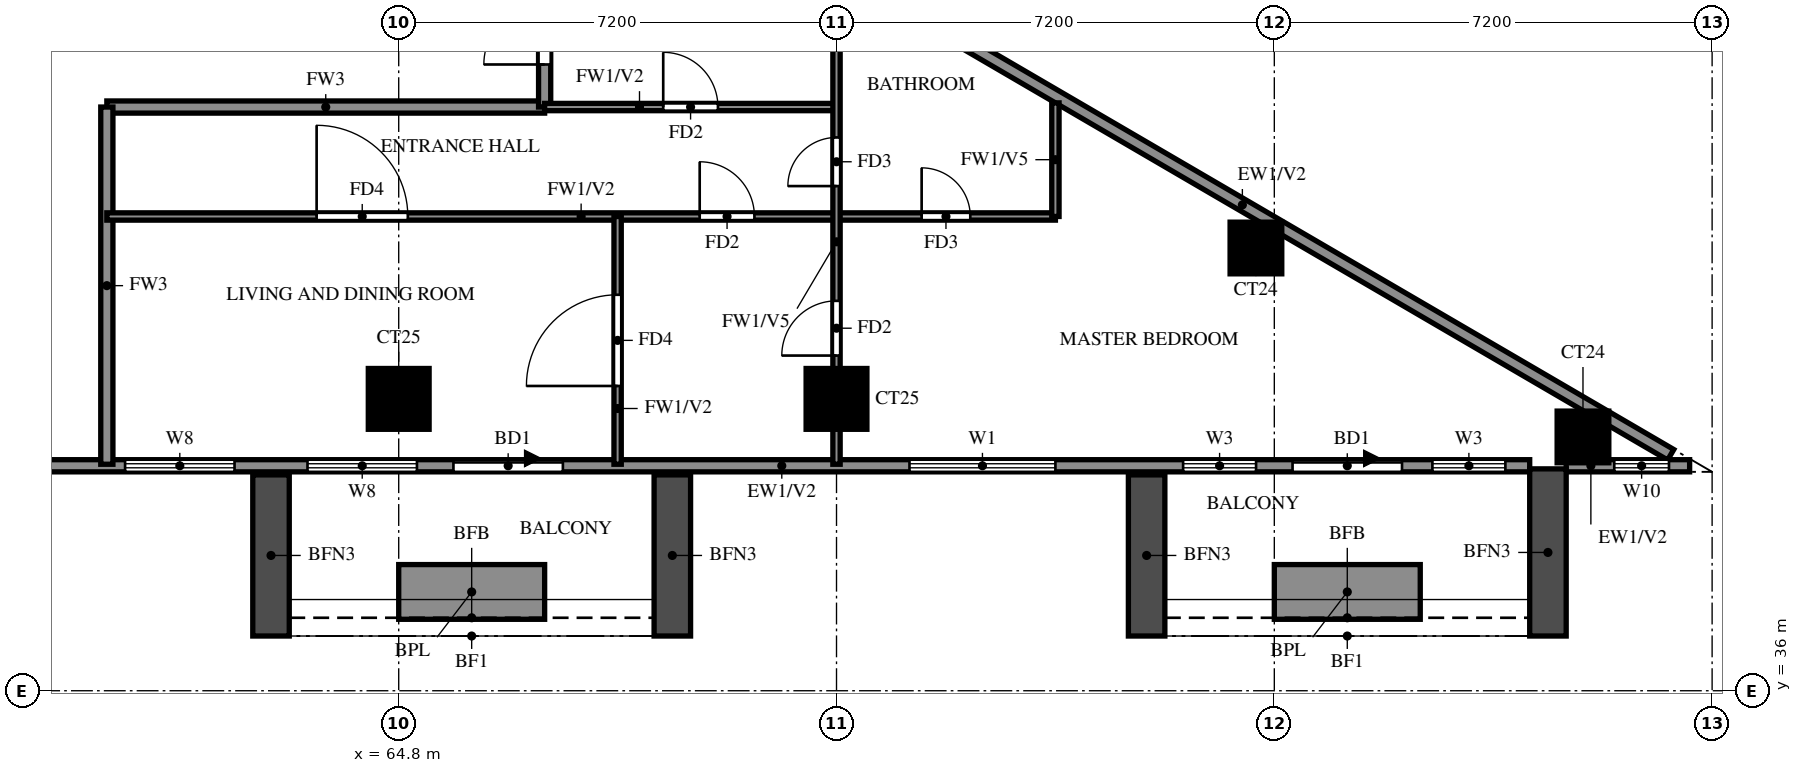
"""IFC4 building model, lengths in metres.
Left out: names, types, materials, properties, quantities, classifications, styles, units other than length and angle.
Written with IfcOpenShell. Run it as: python <this file> out.ifc"""

import sys

from ifc_helpers import new_model, si_unit, direction, frame, frame_2d, origin, origin_2d, place, context, subcontext, project, spatial, rectangle, extrude, source, transform, mapped, element, fill, save


model = new_model("IFC4")
c1 = context("Model", 3, precision=1e-05, world=origin(), true_north=direction((0.0, 1.0)))
c2 = subcontext(c1, "Body", "Model", "MODEL_VIEW")
j1 = project(units=[si_unit("LENGTHUNIT", "METRE"), si_unit("PLANEANGLEUNIT", "RADIAN")], contexts=[c1])
p1 = place(None, origin())
s1 = spatial("IfcSite", under=j1, at=p1, CompositionType="ELEMENT")
p2 = place(p1, origin())
s2 = spatial("IfcBuilding", under=s1, at=p2, CompositionType="ELEMENT")
p3 = place(p2, frame((0.0, 0.0, 171.0)))
s3 = spatial("IfcBuildingStorey", under=s2, at=p3, CompositionType="ELEMENT", Elevation=171.0)
m1 = source(origin(), c2, "Body", "SweptSolid", [
    extrude(rectangle(XDim=0.85, YDim=0.85, at=origin_2d()), origin(), (0.0, 0.0, 1.0), 3.2),
])
p4 = place(p3, frame((84.276, 40.174, 0.0), z_axis=(0.0, 0.0, 1.0), x_axis=(1.0, 0.0, 0.0)))
e1 = element("IfcColumn", 1, at=p4, inside=s3, PredefinedType="COLUMN", context=c2, shape_type="MappedRepresentation", body=[
    mapped(m1, transform((0.0, 0.0, 0.0))),
])
m2 = source(origin(), c2, "Body", "SweptSolid", [
    extrude(rectangle(XDim=1.0, YDim=1.0, at=origin_2d()), origin(), (0.0, 0.0, 1.0), 3.2),
])
for number, where, z_axis, x_axis in (
    (2, (64.8, 40.8, 0.0), (0.0, 0.0, 1.0), (1.0, 0.0, 0.0)),
    (3, (72.0, 40.8, 0.0), (0.0, 0.0, 1.0), (1.0, 0.0, 0.0)),
):
    element("IfcColumn", number, at=place(p3, frame(where, z_axis=z_axis, x_axis=x_axis)), inside=s3, PredefinedType="COLUMN", context=c2, shape_type="MappedRepresentation", body=[
        mapped(m2, transform((0.0, 0.0, 0.0))),
    ])
p5 = place(p3, frame((78.898, 43.282, 0.0), z_axis=(0.0, 0.0, 1.0), x_axis=(1.0, 0.0, 0.0)))
e4 = element("IfcColumn", 4, at=p5, inside=s3, PredefinedType="COLUMN", context=c2, shape_type="MappedRepresentation", body=[
    mapped(m1, transform((0.0, 0.0, 0.0))),
])
p6 = place(p3, frame((85.719, 39.881, 0.0), z_axis=(0.0, 0.0, 1.0), x_axis=(-0.86377618652, 0.503875678716, 0.0)))
e5 = element("IfcWall", 5, at=p6, inside=s3, PredefinedType="SOLIDWALL", context=c2, shape_type="SweptSolid", body=[
    extrude(rectangle(XDim=16.311, YDim=0.2, at=frame_2d((8.156, 0.0))), origin(), (0.0, 0.0, 1.0), 3.2),
])
p7 = place(p6, frame((13.326, 0.0, 1.5)))
e6 = element("IfcOpeningElement", 6, at=p7, cuts=e5, PredefinedType="OPENING", context=c2, shape_type="SweptSolid", body=[
    extrude(rectangle(XDim=0.9, YDim=0.9, at=frame_2d((0.45, 0.45))), frame((0.0, 0.11, 0.0), z_axis=(0.0, -1.0, 0.0), x_axis=(1.0, 0.0, 0.0)), (0.0, 0.0, 1.0), 0.22),
])
p8 = place(p3, frame((58.8, 39.7, 0.0), z_axis=(0.0, 0.0, 1.0), x_axis=(1.0, 0.0, 0.0)))
e7 = element("IfcWall", 7, at=p8, inside=s3, PredefinedType="SOLIDWALL", context=c2, shape_type="SweptSolid", body=[
    extrude(rectangle(XDim=24.6, YDim=0.2, at=frame_2d((12.3, 0.0))), origin(), (0.0, 0.0, 1.0), 3.2),
])
p9 = place(p8, frame((6.9, 0.0, 0.0)))
e8 = element("IfcOpeningElement", 8, at=p9, cuts=e7, PredefinedType="OPENING", context=c2, shape_type="SweptSolid", body=[
    extrude(rectangle(XDim=1.8, YDim=2.4, at=frame_2d((0.9, 1.2))), frame((0.0, 0.11, 0.0), z_axis=(0.0, -1.0, 0.0), x_axis=(1.0, 0.0, 0.0)), (0.0, 0.0, 1.0), 0.22),
])
p10 = place(p8, frame((20.7, 0.0, 0.0)))
e9 = element("IfcOpeningElement", 9, at=p10, cuts=e7, PredefinedType="OPENING", context=c2, shape_type="SweptSolid", body=[
    extrude(rectangle(XDim=1.8, YDim=2.4, at=frame_2d((0.9, 1.2))), frame((0.0, 0.11, 0.0), z_axis=(0.0, -1.0, 0.0), x_axis=(1.0, 0.0, 0.0)), (0.0, 0.0, 1.0), 0.22),
])
p11 = place(p8, frame((1.5, 0.0, 0.6)))
e10 = element("IfcOpeningElement", 10, at=p11, cuts=e7, PredefinedType="OPENING", context=c2, shape_type="SweptSolid", body=[
    extrude(rectangle(XDim=1.8, YDim=2.4, at=frame_2d((0.9, 1.2))), frame((0.0, 0.11, 0.0), z_axis=(0.0, -1.0, 0.0), x_axis=(1.0, 0.0, 0.0)), (0.0, 0.0, 1.0), 0.22),
])
p12 = place(p8, frame((4.5, 0.0, 0.6)))
e11 = element("IfcOpeningElement", 11, at=p12, cuts=e7, PredefinedType="OPENING", context=c2, shape_type="SweptSolid", body=[
    extrude(rectangle(XDim=1.8, YDim=2.4, at=frame_2d((0.9, 1.2))), frame((0.0, 0.11, 0.0), z_axis=(0.0, -1.0, 0.0), x_axis=(1.0, 0.0, 0.0)), (0.0, 0.0, 1.0), 0.22),
])
p13 = place(p8, frame((14.4, 0.0, 0.6)))
e12 = element("IfcOpeningElement", 12, at=p13, cuts=e7, PredefinedType="OPENING", context=c2, shape_type="SweptSolid", body=[
    extrude(rectangle(XDim=2.4, YDim=2.4, at=frame_2d((1.2, 1.2))), frame((0.0, 0.11, 0.0), z_axis=(0.0, -1.0, 0.0), x_axis=(1.0, 0.0, 0.0)), (0.0, 0.0, 1.0), 0.22),
])
p14 = place(p8, frame((18.9, 0.0, 0.6)))
e13 = element("IfcOpeningElement", 13, at=p14, cuts=e7, PredefinedType="OPENING", context=c2, shape_type="SweptSolid", body=[
    extrude(rectangle(XDim=1.2, YDim=2.4, at=frame_2d((0.6, 1.2))), frame((0.0, 0.11, 0.0), z_axis=(0.0, -1.0, 0.0), x_axis=(1.0, 0.0, 0.0)), (0.0, 0.0, 1.0), 0.22),
])
p15 = place(p8, frame((23.0, 0.0, 0.6)))
e14 = element("IfcOpeningElement", 14, at=p15, cuts=e7, PredefinedType="OPENING", context=c2, shape_type="SweptSolid", body=[
    extrude(rectangle(XDim=1.2, YDim=2.4, at=frame_2d((0.6, 1.2))), frame((0.0, 0.11, 0.0), z_axis=(0.0, -1.0, 0.0), x_axis=(1.0, 0.0, 0.0)), (0.0, 0.0, 1.0), 0.22),
])
p16 = place(p3, frame((84.0, 39.7, 0.0), z_axis=(0.0, 0.0, 1.0), x_axis=(1.0, 0.0, 0.0)))
e15 = element("IfcWall", 15, at=p16, inside=s3, PredefinedType="SOLIDWALL", context=c2, shape_type="SweptSolid", body=[
    extrude(rectangle(XDim=2.03, YDim=0.2, at=frame_2d((1.015, 0.0))), origin(), (0.0, 0.0, 1.0), 3.2),
])
p17 = place(p16, frame((0.791, 0.0, 0.6)))
e16 = element("IfcOpeningElement", 16, at=p17, cuts=e15, PredefinedType="OPENING", context=c2, shape_type="SweptSolid", body=[
    extrude(rectangle(XDim=0.9, YDim=2.4, at=frame_2d((0.45, 1.2))), frame((0.0, 0.11, 0.0), z_axis=(0.0, -1.0, 0.0), x_axis=(1.0, 0.0, 0.0)), (0.0, 0.0, 1.0), 0.22),
])
for number, where, z_axis, x_axis in (
    (17, (62.7, 39.55, 0.0), (0.0, 0.0, 1.0), (0.0, -1.0, 0.0)),
    (18, (69.3, 39.55, 0.0), (0.0, 0.0, 1.0), (0.0, -1.0, 0.0)),
):
    element("IfcWall", number, at=place(p3, frame(where, z_axis=z_axis, x_axis=x_axis)), inside=s3, PredefinedType="SOLIDWALL", context=c2, shape_type="SweptSolid", body=[
        extrude(rectangle(XDim=2.65, YDim=0.6, at=frame_2d((1.325, 0.0))), origin(), (0.0, 0.0, 1.0), 2.85),
    ])
p18 = place(p3, frame((64.8, 37.625, 0.0), z_axis=(0.0, 0.0, 1.0), x_axis=(1.0, 0.0, 0.0)))
e19 = element("IfcWall", 19, at=p18, inside=s3, PredefinedType="SOLIDWALL", context=c2, shape_type="SweptSolid", body=[
    extrude(rectangle(XDim=2.4, YDim=0.9, at=frame_2d((1.2, 0.0))), origin(), (0.0, 0.0, 1.0), 0.9),
])
p19 = place(p3, frame((77.1, 39.55, 0.0), z_axis=(0.0, 0.0, 1.0), x_axis=(0.0, -1.0, 0.0)))
e20 = element("IfcWall", 20, at=p19, inside=s3, PredefinedType="SOLIDWALL", context=c2, shape_type="SweptSolid", body=[
    extrude(rectangle(XDim=2.65, YDim=0.6, at=frame_2d((1.325, 0.0))), origin(), (0.0, 0.0, 1.0), 2.85),
])
p20 = place(p3, frame((83.7, 39.649, 0.0), z_axis=(0.0, 0.0, 1.0), x_axis=(0.0, -1.0, 0.0)))
e21 = element("IfcWall", 21, at=p20, inside=s3, PredefinedType="SOLIDWALL", context=c2, shape_type="SweptSolid", body=[
    extrude(rectangle(XDim=2.749, YDim=0.6, at=frame_2d((1.375, 0.0))), origin(), (0.0, 0.0, 1.0), 2.85),
])
p21 = place(p3, frame((79.2, 37.625, 0.0), z_axis=(0.0, 0.0, 1.0), x_axis=(1.0, 0.0, 0.0)))
e22 = element("IfcWall", 22, at=p21, inside=s3, PredefinedType="SOLIDWALL", context=c2, shape_type="SweptSolid", body=[
    extrude(rectangle(XDim=2.4, YDim=0.9, at=frame_2d((1.2, 0.0))), origin(), (0.0, 0.0, 1.0), 0.9),
])
p22 = place(p3, frame((60.0, 45.6, 0.0), z_axis=(0.0, 0.0, 1.0), x_axis=(1.0, 0.0, 0.0)))
e23 = element("IfcWall", 23, at=p22, inside=s3, PredefinedType="SOLIDWALL", context=c2, shape_type="SweptSolid", body=[
    extrude(rectangle(XDim=7.2, YDim=0.2, at=frame_2d((3.6, 0.0))), origin(), (0.0, 0.0, 1.0), 3.2),
])
p23 = place(p3, frame((60.0, 39.725, 0.0), z_axis=(0.0, 0.0, 1.0), x_axis=(0.0, 1.0, 0.0)))
e24 = element("IfcWall", 24, at=p23, inside=s3, PredefinedType="SOLIDWALL", context=c2, shape_type="SweptSolid", body=[
    extrude(rectangle(XDim=5.875, YDim=0.2, at=frame_2d((2.938, 0.0))), origin(), (0.0, 0.0, 1.0), 3.2),
])
p24 = place(p3, frame((67.2, 45.6, 0.0), z_axis=(0.0, 0.0, 1.0), x_axis=(0.0, 1.0, 0.0)))
e25 = element("IfcWall", 25, at=p24, inside=s3, PredefinedType="SOLIDWALL", context=c2, shape_type="SweptSolid", body=[
    extrude(rectangle(XDim=16.8, YDim=0.2, at=frame_2d((8.4, 0.0))), origin(), (0.0, 0.0, 1.0), 3.2),
])
p25 = place(p24, frame((6.7, 0.0, 0.0)))
e26 = element("IfcOpeningElement", 26, at=p25, cuts=e25, PredefinedType="OPENING", context=c2, shape_type="SweptSolid", body=[
    extrude(rectangle(XDim=1.0, YDim=2.1, at=frame_2d((0.5, 1.05))), frame((0.0, 0.11, 0.0), z_axis=(0.0, -1.0, 0.0), x_axis=(1.0, 0.0, 0.0)), (0.0, 0.0, 1.0), 0.22),
])
p26 = place(p24, frame((15.1, 0.0, 0.0)))
e27 = element("IfcOpeningElement", 27, at=p26, cuts=e25, PredefinedType="OPENING", context=c2, shape_type="SweptSolid", body=[
    extrude(rectangle(XDim=1.0, YDim=2.1, at=frame_2d((0.5, 1.05))), frame((0.0, 0.11, 0.0), z_axis=(0.0, -1.0, 0.0), x_axis=(1.0, 0.0, 0.0)), (0.0, 0.0, 1.0), 0.22),
])
p27 = place(p24, frame((0.7, 0.0, 0.0)))
e28 = element("IfcOpeningElement", 28, at=p27, cuts=e25, PredefinedType="OPENING", context=c2, shape_type="SweptSolid", body=[
    extrude(rectangle(XDim=1.0, YDim=2.1, at=frame_2d((0.5, 1.05))), frame((0.0, 0.11, 0.0), z_axis=(0.0, -1.0, 0.0), x_axis=(1.0, 0.0, 0.0)), (0.0, 0.0, 1.0), 0.22),
])
p28 = place(p3, frame((60.0, 43.8, 0.0), z_axis=(0.0, 0.0, 1.0), x_axis=(1.0, 0.0, 0.0)))
e29 = element("IfcWall", 29, at=p28, inside=s3, PredefinedType="PARTITIONING", context=c2, shape_type="SweptSolid", body=[
    extrude(rectangle(XDim=15.6, YDim=0.12, at=frame_2d((7.8, 0.0))), origin(), (0.0, 0.0, 1.0), 3.2),
])
p29 = place(p28, frame((9.75, 0.0, 0.0)))
e30 = element("IfcOpeningElement", 30, at=p29, cuts=e29, PredefinedType="OPENING", context=c2, shape_type="SweptSolid", body=[
    extrude(rectangle(XDim=0.9, YDim=2.1, at=frame_2d((0.45, 1.05))), frame((0.0, 0.07, 0.0), z_axis=(0.0, -1.0, 0.0), x_axis=(1.0, 0.0, 0.0)), (0.0, 0.0, 1.0), 0.14),
])
p30 = place(p28, frame((3.45, 0.0, 0.0)))
e31 = element("IfcOpeningElement", 31, at=p30, cuts=e29, PredefinedType="OPENING", context=c2, shape_type="SweptSolid", body=[
    extrude(rectangle(XDim=1.5, YDim=2.1, at=frame_2d((0.75, 1.05))), frame((0.0, 0.07, 0.0), z_axis=(0.0, -1.0, 0.0), x_axis=(1.0, 0.0, 0.0)), (0.0, 0.0, 1.0), 0.14),
])
p31 = place(p28, frame((13.4, 0.0, 0.0)))
e32 = element("IfcOpeningElement", 32, at=p31, cuts=e29, PredefinedType="OPENING", context=c2, shape_type="SweptSolid", body=[
    extrude(rectangle(XDim=0.8, YDim=2.1, at=frame_2d((0.4, 1.05))), frame((0.0, 0.07, 0.0), z_axis=(0.0, -1.0, 0.0), x_axis=(1.0, 0.0, 0.0)), (0.0, 0.0, 1.0), 0.14),
])
p32 = place(p3, frame((67.2, 45.6, 0.0), z_axis=(0.0, 0.0, 1.0), x_axis=(1.0, 0.0, 0.0)))
e33 = element("IfcWall", 33, at=p32, inside=s3, PredefinedType="PARTITIONING", context=c2, shape_type="SweptSolid", body=[
    extrude(rectangle(XDim=4.8, YDim=0.12, at=frame_2d((2.4, 0.0))), origin(), (0.0, 0.0, 1.0), 3.2),
])
p33 = place(p32, frame((1.95, 0.0, 0.0)))
e34 = element("IfcOpeningElement", 34, at=p33, cuts=e33, PredefinedType="OPENING", context=c2, shape_type="SweptSolid", body=[
    extrude(rectangle(XDim=0.9, YDim=2.1, at=frame_2d((0.45, 1.05))), frame((0.0, 0.07, 0.0), z_axis=(0.0, -1.0, 0.0), x_axis=(1.0, 0.0, 0.0)), (0.0, 0.0, 1.0), 0.14),
])
p34 = place(p3, frame((68.4, 39.725, 0.0), z_axis=(0.0, 0.0, 1.0), x_axis=(0.0, 1.0, 0.0)))
e35 = element("IfcWall", 35, at=p34, inside=s3, PredefinedType="PARTITIONING", context=c2, shape_type="SweptSolid", body=[
    extrude(rectangle(XDim=4.075, YDim=0.12, at=frame_2d((2.038, 0.0))), origin(), (0.0, 0.0, 1.0), 3.2),
])
p35 = place(p34, frame((1.288, 0.0, 0.0)))
e36 = element("IfcOpeningElement", 36, at=p35, cuts=e35, PredefinedType="OPENING", context=c2, shape_type="SweptSolid", body=[
    extrude(rectangle(XDim=1.5, YDim=2.1, at=frame_2d((0.75, 1.05))), frame((0.0, 0.07, 0.0), z_axis=(0.0, -1.0, 0.0), x_axis=(1.0, 0.0, 0.0)), (0.0, 0.0, 1.0), 0.14),
])
p36 = place(p3, frame((72.0, 39.725, 0.0), z_axis=(0.0, 0.0, 1.0), x_axis=(0.0, 1.0, 0.0)))
e37 = element("IfcWall", 37, at=p36, inside=s3, PredefinedType="PARTITIONING", context=c2, shape_type="SweptSolid", body=[
    extrude(rectangle(XDim=8.13, YDim=0.12, at=frame_2d((4.065, 0.0))), origin(), (0.0, 0.0, 1.0), 2.3),
])
p37 = place(p36, frame((1.788, 0.0, 0.0)))
e38 = element("IfcOpeningElement", 38, at=p37, cuts=e37, PredefinedType="OPENING", context=c2, shape_type="SweptSolid", body=[
    extrude(rectangle(XDim=0.9, YDim=2.1, at=frame_2d((0.45, 1.05))), frame((0.0, 0.07, 0.0), z_axis=(0.0, -1.0, 0.0), x_axis=(1.0, 0.0, 0.0)), (0.0, 0.0, 1.0), 0.14),
])
p38 = place(p36, frame((4.575, 0.0, 0.0)))
e39 = element("IfcOpeningElement", 39, at=p38, cuts=e37, PredefinedType="OPENING", context=c2, shape_type="SweptSolid", body=[
    extrude(rectangle(XDim=0.8, YDim=2.1, at=frame_2d((0.4, 1.05))), frame((0.0, 0.07, 0.0), z_axis=(0.0, -1.0, 0.0), x_axis=(1.0, 0.0, 0.0)), (0.0, 0.0, 1.0), 0.14),
])
p39 = place(p3, frame((75.6, 43.8, 0.0), z_axis=(0.0, 0.0, 1.0), x_axis=(0.0, 1.0, 0.0)))
e40 = element("IfcWall", 40, at=p39, inside=s3, PredefinedType="PARTITIONING", context=c2, shape_type="SweptSolid", body=[
    extrude(rectangle(XDim=1.868, YDim=0.12, at=frame_2d((0.934, 0.0))), origin(), (0.0, 0.0, 1.0), 2.3),
])
p40 = place(p9, origin())
e41 = element("IfcDoor", 41, at=p40, inside=s3, OperationType="DOUBLE_DOOR_SLIDING", PredefinedType="DOOR", context=c2, shape_type="SweptSolid", body=[
    extrude(rectangle(XDim=1.8, YDim=2.4, at=frame_2d((0.9, 1.2))), frame((0.0, 0.025, 0.0), z_axis=(0.0, -1.0, 0.0), x_axis=(1.0, 0.0, 0.0)), (0.0, 0.0, 1.0), 0.05),
])
fill(e8, e41)
p41 = place(p10, origin())
e42 = element("IfcDoor", 42, at=p41, inside=s3, OperationType="DOUBLE_DOOR_SLIDING", PredefinedType="DOOR", context=c2, shape_type="SweptSolid", body=[
    extrude(rectangle(XDim=1.8, YDim=2.4, at=frame_2d((0.9, 1.2))), frame((0.0, 0.025, 0.0), z_axis=(0.0, -1.0, 0.0), x_axis=(1.0, 0.0, 0.0)), (0.0, 0.0, 1.0), 0.05),
])
fill(e9, e42)
p42 = place(p11, origin())
e43 = element("IfcWindow", 43, at=p42, inside=s3, PartitioningType="DOUBLE_PANEL_VERTICAL", PredefinedType="WINDOW", context=c2, shape_type="SweptSolid", body=[
    extrude(rectangle(XDim=1.8, YDim=2.4, at=frame_2d((0.9, 1.2))), frame((0.0, 0.03, 0.0), z_axis=(0.0, -1.0, 0.0), x_axis=(1.0, 0.0, 0.0)), (0.0, 0.0, 1.0), 0.06),
])
fill(e10, e43)
p43 = place(p12, origin())
e44 = element("IfcWindow", 44, at=p43, inside=s3, PartitioningType="DOUBLE_PANEL_VERTICAL", PredefinedType="WINDOW", context=c2, shape_type="SweptSolid", body=[
    extrude(rectangle(XDim=1.8, YDim=2.4, at=frame_2d((0.9, 1.2))), frame((0.0, 0.03, 0.0), z_axis=(0.0, -1.0, 0.0), x_axis=(1.0, 0.0, 0.0)), (0.0, 0.0, 1.0), 0.06),
])
fill(e11, e44)
p44 = place(p13, origin())
e45 = element("IfcWindow", 45, at=p44, inside=s3, PartitioningType="DOUBLE_PANEL_VERTICAL", PredefinedType="WINDOW", context=c2, shape_type="SweptSolid", body=[
    extrude(rectangle(XDim=2.4, YDim=2.4, at=frame_2d((1.2, 1.2))), frame((0.0, 0.03, 0.0), z_axis=(0.0, -1.0, 0.0), x_axis=(1.0, 0.0, 0.0)), (0.0, 0.0, 1.0), 0.06),
])
fill(e12, e45)
p45 = place(p14, origin())
e46 = element("IfcWindow", 46, at=p45, inside=s3, PartitioningType="SINGLE_PANEL", PredefinedType="WINDOW", context=c2, shape_type="SweptSolid", body=[
    extrude(rectangle(XDim=1.2, YDim=2.4, at=frame_2d((0.6, 1.2))), frame((0.0, 0.03, 0.0), z_axis=(0.0, -1.0, 0.0), x_axis=(1.0, 0.0, 0.0)), (0.0, 0.0, 1.0), 0.06),
])
fill(e13, e46)
p46 = place(p15, origin())
e47 = element("IfcWindow", 47, at=p46, inside=s3, PartitioningType="SINGLE_PANEL", PredefinedType="WINDOW", context=c2, shape_type="SweptSolid", body=[
    extrude(rectangle(XDim=1.2, YDim=2.4, at=frame_2d((0.6, 1.2))), frame((0.0, 0.03, 0.0), z_axis=(0.0, -1.0, 0.0), x_axis=(1.0, 0.0, 0.0)), (0.0, 0.0, 1.0), 0.06),
])
fill(e14, e47)
p47 = place(p17, origin())
e48 = element("IfcWindow", 48, at=p47, inside=s3, PartitioningType="SINGLE_PANEL", PredefinedType="WINDOW", context=c2, shape_type="SweptSolid", body=[
    extrude(rectangle(XDim=0.9, YDim=2.4, at=frame_2d((0.45, 1.2))), frame((0.0, 0.03, 0.0), z_axis=(0.0, -1.0, 0.0), x_axis=(1.0, 0.0, 0.0)), (0.0, 0.0, 1.0), 0.06),
])
fill(e16, e48)
p48 = place(p35, origin())
e49 = element("IfcDoor", 49, at=p48, inside=s3, OperationType="SINGLE_SWING_LEFT", PredefinedType="DOOR", context=c2, shape_type="SweptSolid", body=[
    extrude(rectangle(XDim=1.5, YDim=2.1, at=frame_2d((0.75, 1.05))), frame((0.0, 0.025, 0.0), z_axis=(0.0, -1.0, 0.0), x_axis=(1.0, 0.0, 0.0)), (0.0, 0.0, 1.0), 0.05),
])
fill(e36, e49)
p49 = place(p33, origin())
e50 = element("IfcDoor", 50, at=p49, inside=s3, OperationType="SINGLE_SWING_LEFT", PredefinedType="DOOR", context=c2, shape_type="SweptSolid", body=[
    extrude(rectangle(XDim=0.9, YDim=2.1, at=frame_2d((0.45, 1.05))), frame((0.0, 0.025, 0.0), z_axis=(0.0, -1.0, 0.0), x_axis=(1.0, 0.0, 0.0)), (0.0, 0.0, 1.0), 0.05),
])
fill(e34, e50)
p50 = place(p27, origin())
e51 = element("IfcDoor", 51, at=p50, inside=s3, OperationType="SINGLE_SWING_RIGHT", PredefinedType="DOOR", context=c2, shape_type="SweptSolid", body=[
    extrude(rectangle(XDim=1.0, YDim=2.1, at=frame_2d((0.5, 1.05))), frame((0.0, 0.025, 0.0), z_axis=(0.0, -1.0, 0.0), x_axis=(1.0, 0.0, 0.0)), (0.0, 0.0, 1.0), 0.05),
])
fill(e28, e51)
p51 = place(p29, origin())
e52 = element("IfcDoor", 52, at=p51, inside=s3, OperationType="SINGLE_SWING_LEFT", PredefinedType="DOOR", context=c2, shape_type="SweptSolid", body=[
    extrude(rectangle(XDim=0.9, YDim=2.1, at=frame_2d((0.45, 1.05))), frame((0.0, 0.025, 0.0), z_axis=(0.0, -1.0, 0.0), x_axis=(1.0, 0.0, 0.0)), (0.0, 0.0, 1.0), 0.05),
])
fill(e30, e52)
p52 = place(p30, origin())
e53 = element("IfcDoor", 53, at=p52, inside=s3, OperationType="SINGLE_SWING_LEFT", PredefinedType="DOOR", context=c2, shape_type="SweptSolid", body=[
    extrude(rectangle(XDim=1.5, YDim=2.1, at=frame_2d((0.75, 1.05))), frame((0.0, 0.025, 0.0), z_axis=(0.0, -1.0, 0.0), x_axis=(1.0, 0.0, 0.0)), (0.0, 0.0, 1.0), 0.05),
])
fill(e31, e53)
p53 = place(p37, origin())
e54 = element("IfcDoor", 54, at=p53, inside=s3, OperationType="SINGLE_SWING_LEFT", PredefinedType="DOOR", context=c2, shape_type="SweptSolid", body=[
    extrude(rectangle(XDim=0.9, YDim=2.1, at=frame_2d((0.45, 1.05))), frame((0.0, 0.025, 0.0), z_axis=(0.0, -1.0, 0.0), x_axis=(1.0, 0.0, 0.0)), (0.0, 0.0, 1.0), 0.05),
])
fill(e38, e54)
p54 = place(p38, origin())
e55 = element("IfcDoor", 55, at=p54, inside=s3, OperationType="SINGLE_SWING_LEFT", PredefinedType="DOOR", context=c2, shape_type="SweptSolid", body=[
    extrude(rectangle(XDim=0.8, YDim=2.1, at=frame_2d((0.4, 1.05))), frame((0.0, 0.025, 0.0), z_axis=(0.0, -1.0, 0.0), x_axis=(1.0, 0.0, 0.0)), (0.0, 0.0, 1.0), 0.05),
])
fill(e39, e55)
p55 = place(p31, origin())
e56 = element("IfcDoor", 56, at=p55, inside=s3, OperationType="SINGLE_SWING_LEFT", PredefinedType="DOOR", context=c2, shape_type="SweptSolid", body=[
    extrude(rectangle(XDim=0.8, YDim=2.1, at=frame_2d((0.4, 1.05))), frame((0.0, 0.025, 0.0), z_axis=(0.0, -1.0, 0.0), x_axis=(1.0, 0.0, 0.0)), (0.0, 0.0, 1.0), 0.05),
])
fill(e32, e56)
save(model, sys.argv[1])
